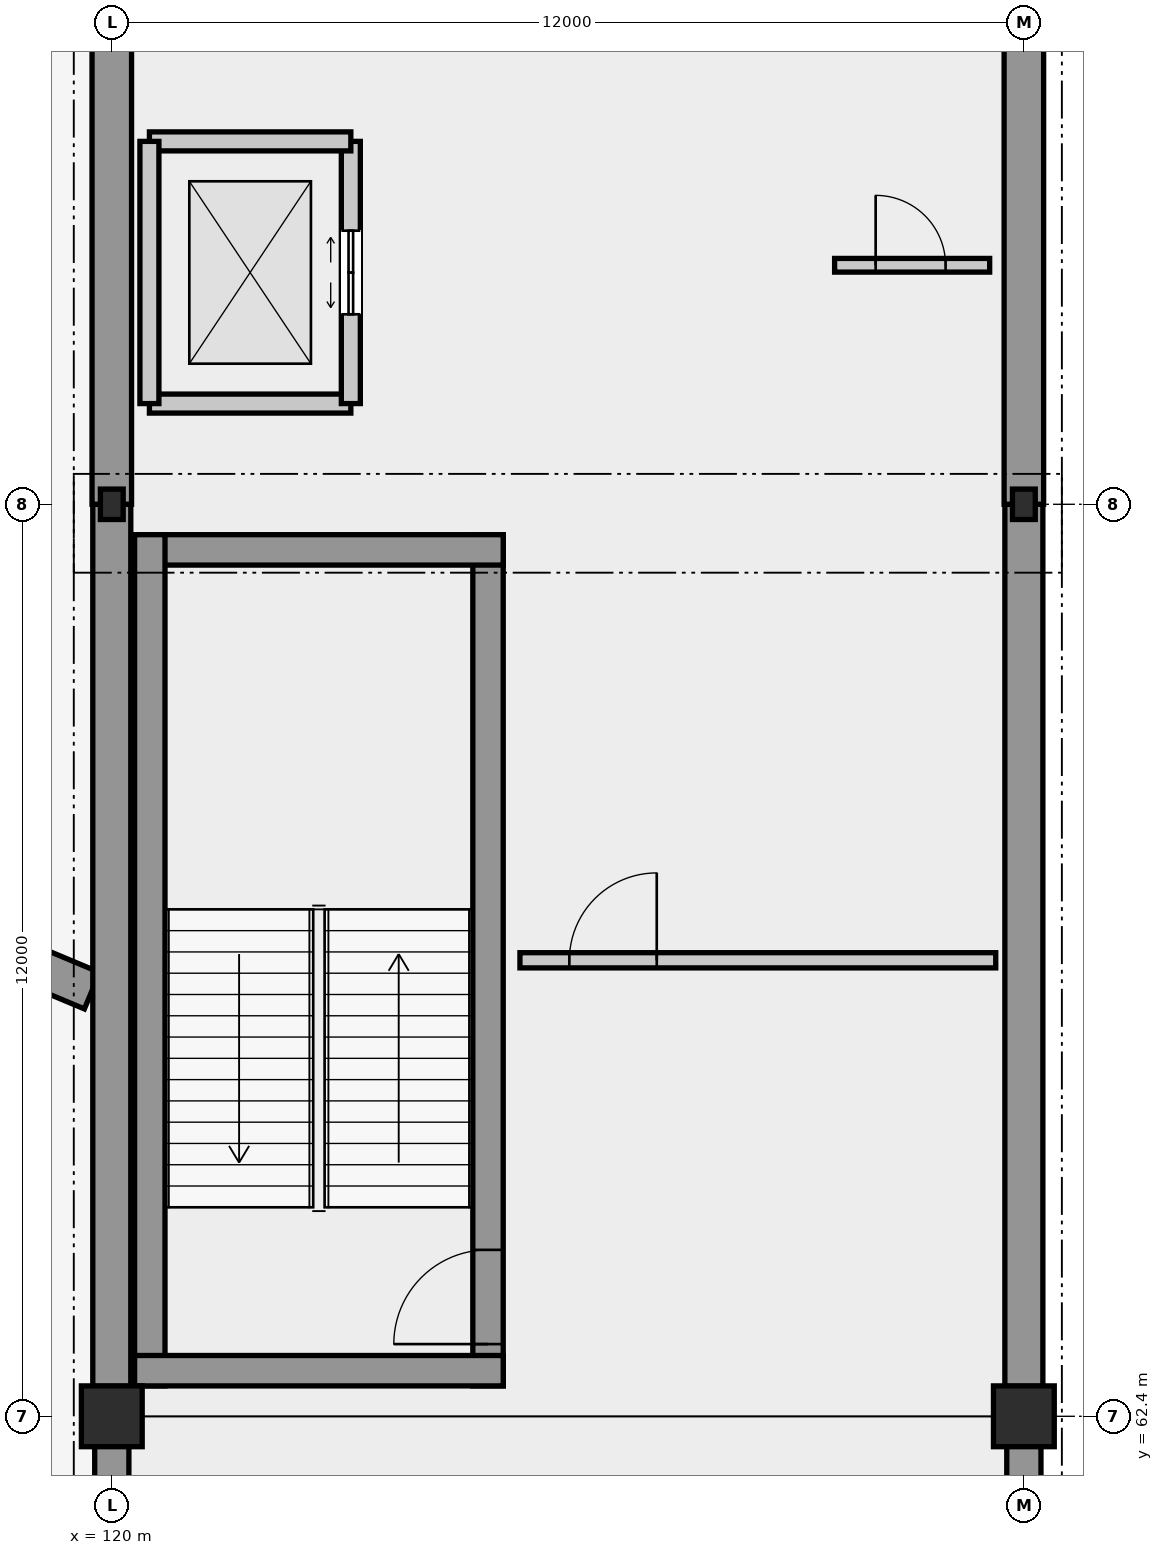
"""IFC4 building model, lengths in metres.
Left out: names, types, materials, properties, quantities, classifications, styles, units other than length and angle.
Written with IfcOpenShell. Run it as: python <this file> out.ifc"""

import sys

from ifc_helpers import new_model, si_unit, direction, frame, frame_2d, origin, origin_2d, place, context, subcontext, project, spatial, rectangle, i_section, extrude, element, fill, save


model = new_model("IFC4")
c1 = context("Model", 3, precision=1e-05, world=origin(), true_north=direction((0.0, 1.0)))
c2 = subcontext(c1, "Body", "Model", "MODEL_VIEW")
j1 = project(units=[si_unit("LENGTHUNIT", "METRE"), si_unit("PLANEANGLEUNIT", "RADIAN")], contexts=[c1])
p1 = place(None, origin())
s1 = spatial("IfcSite", under=j1, at=p1, CompositionType="ELEMENT")
p2 = place(p1, origin())
s2 = spatial("IfcBuilding", under=s1, at=p2, CompositionType="ELEMENT")
p3 = place(p2, frame((0.0, 0.0, -5.4)))
s3 = spatial("IfcBuildingStorey", under=s2, at=p3, CompositionType="ELEMENT", Elevation=-5.4)
p4 = place(p3, frame((120.0, 62.4, 0.0), z_axis=(0.0, 0.0, 1.0), x_axis=(1.0, 0.0, 0.0)))
e1 = element("IfcColumn", 1, at=p4, inside=s3, PredefinedType="COLUMN", context=c2, shape_type="SweptSolid", body=[
    extrude(rectangle(XDim=0.8, YDim=0.8, at=origin_2d()), origin(), (0.0, 0.0, 1.0), 5.4),
])
p5 = place(p3, frame((120.0, 74.4, 0.0), z_axis=(0.0, 0.0, 1.0), x_axis=(1.0, 0.0, 0.0)))
e2 = element("IfcColumn", 2, at=p5, inside=s3, PredefinedType="COLUMN", context=c2, shape_type="SweptSolid", body=[
    extrude(i_section(OverallWidth=0.3, OverallDepth=0.4, WebThickness=0.013, FlangeThickness=0.024, FilletRadius=0.027, at=origin_2d()), origin(), (0.0, 0.0, 1.0), 5.4),
])
p6 = place(p3, frame((132.0, 62.4, 0.0), z_axis=(0.0, 0.0, 1.0), x_axis=(1.0, 0.0, 0.0)))
e3 = element("IfcColumn", 3, at=p6, inside=s3, PredefinedType="COLUMN", context=c2, shape_type="SweptSolid", body=[
    extrude(rectangle(XDim=0.8, YDim=0.8, at=origin_2d()), origin(), (0.0, 0.0, 1.0), 5.4),
])
p7 = place(p3, frame((132.0, 74.4, 0.0), z_axis=(0.0, 0.0, 1.0), x_axis=(1.0, 0.0, 0.0)))
e4 = element("IfcColumn", 4, at=p7, inside=s3, PredefinedType="COLUMN", context=c2, shape_type="SweptSolid", body=[
    extrude(i_section(OverallWidth=0.3, OverallDepth=0.4, WebThickness=0.013, FlangeThickness=0.024, FilletRadius=0.027, at=origin_2d()), origin(), (0.0, 0.0, 1.0), 5.4),
])
p8 = place(p3, frame((103.834, 74.67, 0.0), z_axis=(0.0, 0.0, 1.0), x_axis=(0.922206431843, -0.386697940346, 0.0)))
e5 = element("IfcWall", 5, at=p8, inside=s3, PredefinedType="USERDEFINED", context=c2, shape_type="SweptSolid", body=[
    extrude(rectangle(XDim=17.248, YDim=0.52, at=frame_2d((8.624, 0.0))), origin(), (0.0, 0.0, 1.0), 5.04),
])
for number, where, z_axis, x_axis in (
    (6, (120.0, 62.005, 0.0), (0.0, 0.0, 1.0), (0.0, -1.0, 0.0)),
    (7, (132.0, 50.795, 0.0), (0.0, 0.0, 1.0), (0.0, 1.0, 0.0)),
):
    element("IfcWall", number, at=place(p3, frame(where, z_axis=z_axis, x_axis=x_axis)), inside=s3, PredefinedType="USERDEFINED", context=c2, shape_type="SweptSolid", body=[
        extrude(rectangle(XDim=11.21, YDim=0.45, at=frame_2d((5.605, 0.0))), origin(), (0.0, 0.0, 1.0), 4.54),
    ])
for number, where, z_axis, x_axis in (
    (8, (120.0, 74.4, 0.0), (0.0, 0.0, 1.0), (0.0, -1.0, 0.0)),
    (9, (132.0, 62.795, 0.0), (0.0, 0.0, 1.0), (0.0, 1.0, 0.0)),
):
    element("IfcWall", number, at=place(p3, frame(where, z_axis=z_axis, x_axis=x_axis)), inside=s3, PredefinedType="USERDEFINED", context=c2, shape_type="SweptSolid", body=[
        extrude(rectangle(XDim=11.605, YDim=0.5, at=frame_2d((5.802, 0.0))), origin(), (0.0, 0.0, 1.0), 4.54),
    ])
for number, where, z_axis, x_axis in (
    (10, (120.0, 84.0, 0.0), (0.0, 0.0, 1.0), (0.0, -1.0, 0.0)),
    (11, (132.0, 74.4, 0.0), (0.0, 0.0, 1.0), (0.0, 1.0, 0.0)),
):
    element("IfcWall", number, at=place(p3, frame(where, z_axis=z_axis, x_axis=x_axis)), inside=s3, PredefinedType="USERDEFINED", context=c2, shape_type="SweptSolid", body=[
        extrude(rectangle(XDim=9.6, YDim=0.52, at=frame_2d((4.8, 0.0))), origin(), (0.0, 0.0, 1.0), 4.54),
    ])
p9 = place(p3, frame((124.95, 62.8, 0.0), z_axis=(0.0, 0.0, 1.0), x_axis=(0.0, 1.0, 0.0)))
e12 = element("IfcWall", 12, at=p9, inside=s3, PredefinedType="SHEAR", context=c2, shape_type="SweptSolid", body=[
    extrude(rectangle(XDim=11.2, YDim=0.4, at=frame_2d((5.6, 0.0))), origin(), (0.0, 0.0, 1.0), 5.12),
])
p10 = place(p9, frame((0.55, 0.0, 0.0)))
e13 = element("IfcOpeningElement", 13, at=p10, cuts=e12, PredefinedType="OPENING", context=c2, shape_type="SweptSolid", body=[
    extrude(rectangle(XDim=1.24, YDim=2.25, at=frame_2d((0.62, 1.125))), frame((0.0, 0.21, 0.0), z_axis=(0.0, -1.0, 0.0), x_axis=(1.0, 0.0, 0.0)), (0.0, 0.0, 1.0), 0.42),
])
p11 = place(p3, frame((125.15, 73.8, 0.0), z_axis=(0.0, 0.0, 1.0), x_axis=(-1.0, 0.0, 0.0)))
e14 = element("IfcWall", 14, at=p11, inside=s3, PredefinedType="SHEAR", context=c2, shape_type="SweptSolid", body=[
    extrude(rectangle(XDim=4.85, YDim=0.4, at=frame_2d((2.425, 0.0))), origin(), (0.0, 0.0, 1.0), 5.12),
])
p12 = place(p3, frame((120.5, 74.0, 0.0), z_axis=(0.0, 0.0, 1.0), x_axis=(0.0, -1.0, 0.0)))
e15 = element("IfcWall", 15, at=p12, inside=s3, PredefinedType="SHEAR", context=c2, shape_type="SweptSolid", body=[
    extrude(rectangle(XDim=11.2, YDim=0.4, at=frame_2d((5.6, 0.0))), origin(), (0.0, 0.0, 1.0), 5.12),
])
p13 = place(p3, frame((120.3, 63.0, 0.0), z_axis=(0.0, 0.0, 1.0), x_axis=(1.0, 0.0, 0.0)))
e16 = element("IfcWall", 16, at=p13, inside=s3, PredefinedType="SHEAR", context=c2, shape_type="SweptSolid", body=[
    extrude(rectangle(XDim=4.85, YDim=0.4, at=frame_2d((2.425, 0.0))), origin(), (0.0, 0.0, 1.0), 5.12),
])
p14 = place(p3, frame((120.495, 75.725, 0.0), z_axis=(0.0, 0.0, 1.0), x_axis=(1.0, 0.0, 0.0)))
e17 = element("IfcWall", 17, at=p14, inside=s3, PredefinedType="SOLIDWALL", context=c2, shape_type="SweptSolid", body=[
    extrude(rectangle(XDim=2.65, YDim=0.25, at=frame_2d((1.325, 0.0))), origin(), (0.0, 0.0, 1.0), 5.12),
])
p15 = place(p3, frame((123.145, 75.725, 0.0), z_axis=(0.0, 0.0, 1.0), x_axis=(0.0, 1.0, 0.0)))
e18 = element("IfcWall", 18, at=p15, inside=s3, PredefinedType="SOLIDWALL", context=c2, shape_type="SweptSolid", body=[
    extrude(rectangle(XDim=3.45, YDim=0.25, at=frame_2d((1.725, 0.0))), origin(), (0.0, 0.0, 1.0), 5.12),
])
p16 = place(p15, frame((1.175, 0.0, 0.0)))
e19 = element("IfcOpeningElement", 19, at=p16, cuts=e18, PredefinedType="OPENING", context=c2, shape_type="SweptSolid", body=[
    extrude(rectangle(XDim=1.1, YDim=2.2, at=frame_2d((0.55, 1.1))), frame((0.0, 0.135, 0.0), z_axis=(0.0, -1.0, 0.0), x_axis=(1.0, 0.0, 0.0)), (0.0, 0.0, 1.0), 0.27),
])
p17 = place(p3, frame((123.145, 79.175, 0.0), z_axis=(0.0, 0.0, 1.0), x_axis=(-1.0, 0.0, 0.0)))
e20 = element("IfcWall", 20, at=p17, inside=s3, PredefinedType="SOLIDWALL", context=c2, shape_type="SweptSolid", body=[
    extrude(rectangle(XDim=2.65, YDim=0.25, at=frame_2d((1.325, 0.0))), origin(), (0.0, 0.0, 1.0), 5.12),
])
p18 = place(p3, frame((120.495, 79.175, 0.0), z_axis=(0.0, 0.0, 1.0), x_axis=(0.0, -1.0, 0.0)))
e21 = element("IfcWall", 21, at=p18, inside=s3, PredefinedType="SOLIDWALL", context=c2, shape_type="SweptSolid", body=[
    extrude(rectangle(XDim=3.45, YDim=0.25, at=frame_2d((1.725, 0.0))), origin(), (0.0, 0.0, 1.0), 5.12),
])
p19 = place(p3, frame((125.37, 68.4, 0.0), z_axis=(0.0, 0.0, 1.0), x_axis=(1.0, 0.0, 0.0)))
e22 = element("IfcWall", 22, at=p19, inside=s3, PredefinedType="PARTITIONING", context=c2, shape_type="SweptSolid", body=[
    extrude(rectangle(XDim=6.26, YDim=0.2, at=frame_2d((3.13, 0.0))), origin(), (0.0, 0.0, 1.0), 4.65),
])
p20 = place(p19, frame((0.65, 0.0, 0.0)))
e23 = element("IfcOpeningElement", 23, at=p20, cuts=e22, PredefinedType="OPENING", context=c2, shape_type="SweptSolid", body=[
    extrude(rectangle(XDim=1.15, YDim=2.25, at=frame_2d((0.575, 1.125))), frame((0.0, 0.11, 0.0), z_axis=(0.0, -1.0, 0.0), x_axis=(1.0, 0.0, 0.0)), (0.0, 0.0, 1.0), 0.22),
])
p21 = place(p3, frame((129.51, 77.545, 0.0), z_axis=(0.0, 0.0, 1.0), x_axis=(1.0, 0.0, 0.0)))
e24 = element("IfcWall", 24, at=p21, inside=s3, PredefinedType="PARTITIONING", context=c2, shape_type="SweptSolid", body=[
    extrude(rectangle(XDim=2.04, YDim=0.18, at=frame_2d((1.02, 0.0))), origin(), (0.0, 0.0, 1.0), 4.74),
])
p22 = place(p21, frame((0.54, 0.0, 0.0)))
e25 = element("IfcOpeningElement", 25, at=p22, cuts=e24, PredefinedType="OPENING", context=c2, shape_type="SweptSolid", body=[
    extrude(rectangle(XDim=0.92, YDim=2.15, at=frame_2d((0.46, 1.075))), frame((0.0, 0.1, 0.0), z_axis=(0.0, -1.0, 0.0), x_axis=(1.0, 0.0, 0.0)), (0.0, 0.0, 1.0), 0.2),
])
p23 = place(p10, origin())
e26 = element("IfcDoor", 26, at=p23, inside=s3, OperationType="SINGLE_SWING_LEFT", PredefinedType="DOOR", context=c2, shape_type="SweptSolid", body=[
    extrude(rectangle(XDim=1.24, YDim=2.25, at=frame_2d((0.62, 1.125))), frame((0.0, 0.025, 0.0), z_axis=(0.0, -1.0, 0.0), x_axis=(1.0, 0.0, 0.0)), (0.0, 0.0, 1.0), 0.05),
])
fill(e13, e26)
p24 = place(p16, origin())
e27 = element("IfcDoor", 27, at=p24, inside=s3, OperationType="SLIDING_TO_LEFT", PredefinedType="DOOR", context=c2, shape_type="SweptSolid", body=[
    extrude(rectangle(XDim=1.1, YDim=2.2, at=frame_2d((0.55, 1.1))), frame((0.0, 0.025, 0.0), z_axis=(0.0, -1.0, 0.0), x_axis=(1.0, 0.0, 0.0)), (0.0, 0.0, 1.0), 0.05),
])
fill(e19, e27)
p25 = place(p20, origin())
e28 = element("IfcDoor", 28, at=p25, inside=s3, OperationType="SINGLE_SWING_RIGHT", PredefinedType="DOOR", context=c2, shape_type="SweptSolid", body=[
    extrude(rectangle(XDim=1.15, YDim=2.25, at=frame_2d((0.575, 1.125))), frame((0.0, 0.025, 0.0), z_axis=(0.0, -1.0, 0.0), x_axis=(1.0, 0.0, 0.0)), (0.0, 0.0, 1.0), 0.05),
])
fill(e23, e28)
p26 = place(p22, origin())
e29 = element("IfcDoor", 29, at=p26, inside=s3, OperationType="SINGLE_SWING_LEFT", PredefinedType="DOOR", context=c2, shape_type="SweptSolid", body=[
    extrude(rectangle(XDim=0.92, YDim=2.15, at=frame_2d((0.46, 1.075))), frame((0.0, 0.025, 0.0), z_axis=(0.0, -1.0, 0.0), x_axis=(1.0, 0.0, 0.0)), (0.0, 0.0, 1.0), 0.05),
])
fill(e25, e29)
save(model, sys.argv[1])
